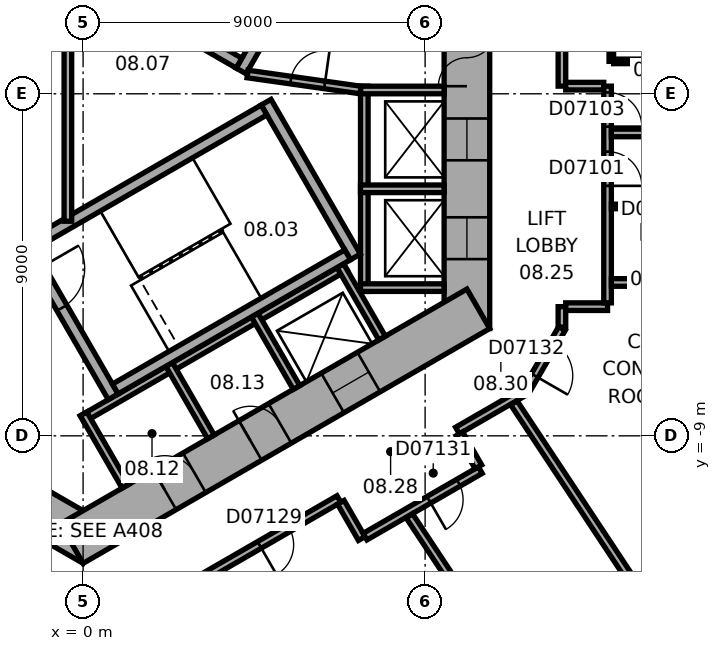
"""IFC4 building model, lengths in metres.
Left out: names, types, materials, properties, quantities, classifications, styles, units other than length and angle.
Written with IfcOpenShell. Run it as: python <this file> out.ifc"""

import sys

from ifc_helpers import new_model, si_unit, direction, frame, frame_2d, origin, place, context, subcontext, project, spatial, rectangle, extrude, element, fill, save


model = new_model("IFC4")
c1 = context("Model", 3, precision=1e-05, world=origin(), true_north=direction((0.0, 1.0)))
c2 = subcontext(c1, "Body", "Model", "MODEL_VIEW")
j1 = project(units=[si_unit("LENGTHUNIT", "METRE"), si_unit("PLANEANGLEUNIT", "RADIAN")], contexts=[c1])
p1 = place(None, origin())
s1 = spatial("IfcSite", under=j1, at=p1, CompositionType="ELEMENT")
p2 = place(p1, origin())
s2 = spatial("IfcBuilding", under=s1, at=p2, CompositionType="ELEMENT")
p3 = place(p2, frame((0.0, 0.0, 47.3)))
s3 = spatial("IfcBuildingStorey", under=s2, at=p3, CompositionType="ELEMENT", Elevation=47.3)
p4 = place(p3, frame((10.1, -6.177, 0.0), z_axis=(0.0, 0.0, 1.0), x_axis=(0.0, 1.0, 0.0)))
e1 = element("IfcWall", 1, at=p4, inside=s3, PredefinedType="SHEAR", context=c2, shape_type="SweptSolid", body=[
    extrude(rectangle(XDim=12.355, YDim=1.2, at=frame_2d((6.177, 0.0))), origin(), (0.0, 0.0, 1.0), 3.3),
])
p5 = place(p4, frame((6.378, 0.0, 0.0)))
e2 = element("IfcOpeningElement", 2, at=p5, cuts=e1, PredefinedType="OPENING", context=c2, shape_type="SweptSolid", body=[
    extrude(rectangle(XDim=1.5, YDim=2.1, at=frame_2d((0.75, 1.05))), frame((0.0, 0.61, 0.0), z_axis=(0.0, -1.0, 0.0), x_axis=(1.0, 0.0, 0.0)), (0.0, 0.0, 1.0), 1.22),
])
p6 = place(p4, frame((1.828, 0.0, 0.0)))
e3 = element("IfcOpeningElement", 3, at=p6, cuts=e1, PredefinedType="OPENING", context=c2, shape_type="SweptSolid", body=[
    extrude(rectangle(XDim=1.1, YDim=2.1, at=frame_2d((0.55, 1.05))), frame((0.0, 0.61, 0.0), z_axis=(0.0, -1.0, 0.0), x_axis=(1.0, 0.0, 0.0)), (0.0, 0.0, 1.0), 1.22),
])
p7 = place(p4, frame((4.427, 0.0, 0.0)))
e4 = element("IfcOpeningElement", 4, at=p7, cuts=e1, PredefinedType="OPENING", context=c2, shape_type="SweptSolid", body=[
    extrude(rectangle(XDim=1.1, YDim=2.1, at=frame_2d((0.55, 1.05))), frame((0.0, 0.61, 0.0), z_axis=(0.0, -1.0, 0.0), x_axis=(1.0, 0.0, 0.0)), (0.0, 0.0, 1.0), 1.22),
])
p8 = place(p3, frame((-10.4, -5.658, 0.0), z_axis=(0.0, 0.0, 1.0), x_axis=(0.866021384402, -0.500006961711, 0.0)))
e5 = element("IfcWall", 5, at=p8, inside=s3, PredefinedType="SHEAR", context=c2, shape_type="SweptSolid", body=[
    extrude(rectangle(XDim=12.355, YDim=1.2, at=frame_2d((6.178, 0.0))), origin(), (0.0, 0.0, 1.0), 3.3),
])
p9 = place(p8, frame((6.378, 0.0, 0.0)))
e6 = element("IfcOpeningElement", 6, at=p9, cuts=e5, PredefinedType="OPENING", context=c2, shape_type="SweptSolid", body=[
    extrude(rectangle(XDim=1.5, YDim=2.1, at=frame_2d((0.75, 1.05))), frame((0.0, 0.61, 0.0), z_axis=(0.0, -1.0, 0.0), x_axis=(1.0, 0.0, 0.0)), (0.0, 0.0, 1.0), 1.22),
])
p10 = place(p8, frame((3.228, 0.0, 0.0)))
e7 = element("IfcOpeningElement", 7, at=p10, cuts=e5, PredefinedType="OPENING", context=c2, shape_type="SweptSolid", body=[
    extrude(rectangle(XDim=0.9, YDim=2.1, at=frame_2d((0.45, 1.05))), frame((0.0, 0.61, 0.0), z_axis=(0.0, -1.0, 0.0), x_axis=(1.0, 0.0, 0.0)), (0.0, 0.0, 1.0), 1.22),
])
p11 = place(p3, frame((-0.3, -11.836, 0.0), z_axis=(0.0, 0.0, 1.0), x_axis=(0.866021384402, 0.500006961711, 0.0)))
e8 = element("IfcWall", 8, at=p11, inside=s3, PredefinedType="SHEAR", context=c2, shape_type="SweptSolid", body=[
    extrude(rectangle(XDim=12.355, YDim=1.2, at=frame_2d((6.178, 0.0))), origin(), (0.0, 0.0, 1.0), 3.3),
])
p12 = place(p11, frame((2.828, 0.0, 0.0)))
e9 = element("IfcOpeningElement", 9, at=p12, cuts=e8, PredefinedType="OPENING", context=c2, shape_type="SweptSolid", body=[
    extrude(rectangle(XDim=0.9, YDim=2.1, at=frame_2d((0.45, 1.05))), frame((0.0, 0.61, 0.0), z_axis=(0.0, -1.0, 0.0), x_axis=(1.0, 0.0, 0.0)), (0.0, 0.0, 1.0), 1.22),
])
p13 = place(p11, frame((5.428, 0.0, 0.0)))
e10 = element("IfcOpeningElement", 10, at=p13, cuts=e8, PredefinedType="OPENING", context=c2, shape_type="SweptSolid", body=[
    extrude(rectangle(XDim=0.9, YDim=2.1, at=frame_2d((0.45, 1.05))), frame((0.0, 0.61, 0.0), z_axis=(0.0, -1.0, 0.0), x_axis=(1.0, 0.0, 0.0)), (0.0, 0.0, 1.0), 1.22),
])
p14 = place(p11, frame((7.928, 0.0, 0.0)))
e11 = element("IfcOpeningElement", 11, at=p14, cuts=e8, PredefinedType="OPENING", context=c2, shape_type="SweptSolid", body=[
    extrude(rectangle(XDim=1.1, YDim=2.1, at=frame_2d((0.55, 1.05))), frame((0.0, 0.61, 0.0), z_axis=(0.0, -1.0, 0.0), x_axis=(1.0, 0.0, 0.0)), (0.0, 0.0, 1.0), 1.22),
])
p15 = place(p3, frame((7.4, -5.2, 0.0), z_axis=(0.0, 0.0, 1.0), x_axis=(0.0, 1.0, 0.0)))
e12 = element("IfcWall", 12, at=p15, inside=s3, PredefinedType="PARTITIONING", context=c2, shape_type="SweptSolid", body=[
    extrude(rectangle(XDim=5.4, YDim=0.2, at=frame_2d((2.7, 0.0))), origin(), (0.0, 0.0, 1.0), 3.05),
])
for number, where, z_axis, x_axis in (
    (13, (7.3, -5.1, 0.0), (0.0, 0.0, 1.0), (1.0, 0.0, 0.0)),
    (14, (7.3, -2.5, 0.0), (0.0, 0.0, 1.0), (1.0, 0.0, 0.0)),
    (15, (7.3, 0.1, 0.0), (0.0, 0.0, 1.0), (1.0, 0.0, 0.0)),
):
    element("IfcWall", number, at=place(p3, frame(where, z_axis=z_axis, x_axis=x_axis)), inside=s3, PredefinedType="PARTITIONING", context=c2, shape_type="SweptSolid", body=[
        extrude(rectangle(XDim=2.2, YDim=0.2, at=frame_2d((1.1, 0.0))), origin(), (0.0, 0.0, 1.0), 3.05),
    ])
p16 = place(p3, frame((-0.024, -8.559, 0.0), z_axis=(0.0, 0.0, 1.0), x_axis=(0.866026010844, 0.49999894854, 0.0)))
e16 = element("IfcWall", 16, at=p16, inside=s3, PredefinedType="PARTITIONING", context=c2, shape_type="SweptSolid", body=[
    extrude(rectangle(XDim=8.0, YDim=0.2, at=frame_2d((4.0, 0.0))), origin(), (0.0, 0.0, 1.0), 3.05),
])
for number, where, z_axis, x_axis in (
    (17, (0.013, -8.422, 0.0), (0.0, 0.0, 1.0), (0.5, -0.866, 0.0)),
    (18, (2.264, -7.122, 0.0), (0.0, 0.0, 1.0), (0.5, -0.866, 0.0)),
    (19, (4.516, -5.822, 0.0), (0.0, 0.0, 1.0), (0.5, -0.866, 0.0)),
    (20, (6.768, -4.522, 0.0), (0.0, 0.0, 1.0), (0.5, -0.866, 0.0)),
):
    element("IfcWall", number, at=place(p3, frame(where, z_axis=z_axis, x_axis=x_axis)), inside=s3, PredefinedType="PARTITIONING", context=c2, shape_type="SweptSolid", body=[
        extrude(rectangle(XDim=2.2, YDim=0.2, at=frame_2d((1.1, 0.0))), origin(), (0.0, 0.0, 1.0), 3.05),
    ])
p17 = place(p3, frame((4.158, 0.602, 0.0), z_axis=(0.0, 0.0, 1.0), x_axis=(0.499977259774, 0.866038532462, 0.0)))
e21 = element("IfcWall", 21, at=p17, inside=s3, PredefinedType="SHEAR", context=c2, shape_type="SweptSolid", body=[
    extrude(rectangle(XDim=4.7, YDim=0.3, at=frame_2d((2.35, 0.0))), origin(), (0.0, 0.0, 1.0), 3.05),
])
p18 = place(p17, frame((0.8, 0.0, 0.0)))
e22 = element("IfcOpeningElement", 22, at=p18, cuts=e21, PredefinedType="OPENING", context=c2, shape_type="SweptSolid", body=[
    extrude(rectangle(XDim=1.2, YDim=2.1, at=frame_2d((0.6, 1.05))), frame((0.0, 0.16, 0.0), z_axis=(0.0, -1.0, 0.0), x_axis=(1.0, 0.0, 0.0)), (0.0, 0.0, 1.0), 0.32),
])
p19 = place(p3, frame((4.103, 0.807, 0.0), z_axis=(0.0, 0.0, 1.0), x_axis=(-0.866027801685, 0.499995846692, 0.0)))
e23 = element("IfcWall", 23, at=p19, inside=s3, PredefinedType="SHEAR", context=c2, shape_type="SweptSolid", body=[
    extrude(rectangle(XDim=7.06, YDim=0.3, at=frame_2d((3.53, 0.0))), origin(), (0.0, 0.0, 1.0), 3.05),
])
p20 = place(p3, frame((-1.558, -3.902, 0.0), z_axis=(0.0, 0.0, 1.0), x_axis=(0.499977259774, -0.866038532462, 0.0)))
e24 = element("IfcWall", 24, at=p20, inside=s3, PredefinedType="SHEAR", context=c2, shape_type="SweptSolid", body=[
    extrude(rectangle(XDim=4.7, YDim=0.3, at=frame_2d((2.35, 0.0))), origin(), (0.0, 0.0, 1.0), 3.05),
])
p21 = place(p20, frame((0.8, 0.0, 0.0)))
e25 = element("IfcOpeningElement", 25, at=p21, cuts=e24, PredefinedType="OPENING", context=c2, shape_type="SweptSolid", body=[
    extrude(rectangle(XDim=1.2, YDim=2.1, at=frame_2d((0.6, 1.05))), frame((0.0, 0.16, 0.0), z_axis=(0.0, -1.0, 0.0), x_axis=(1.0, 0.0, 0.0)), (0.0, 0.0, 1.0), 0.32),
])
p22 = place(p3, frame((4.816, -0.222, 0.0), z_axis=(0.0, 0.0, 1.0), x_axis=(0.499977259774, -0.866038532462, 0.0)))
e26 = element("IfcWall", 26, at=p22, inside=s3, PredefinedType="SHEAR", context=c2, shape_type="SweptSolid", body=[
    extrude(rectangle(XDim=4.7, YDim=0.3, at=frame_2d((2.35, 0.0))), origin(), (0.0, 0.0, 1.0), 3.05),
])
for number, where, z_axis, x_axis in (
    (27, (-1.353, -3.957, 0.0), (0.0, 0.0, 1.0), (0.866, 0.5, 0.0)),
    (28, (0.847, -7.767, 0.0), (0.0, 0.0, 1.0), (0.866, 0.5, 0.0)),
):
    element("IfcWall", number, at=place(p3, frame(where, z_axis=z_axis, x_axis=x_axis)), inside=s3, PredefinedType="SHEAR", context=c2, shape_type="SweptSolid", body=[
        extrude(rectangle(XDim=7.06, YDim=0.3, at=frame_2d((3.53, 0.0))), origin(), (0.0, 0.0, 1.0), 3.05),
    ])
p23 = place(p3, frame((4.327, 0.521, 0.0), z_axis=(0.0, 0.0, 1.0), x_axis=(0.990124376366, -0.14019172346, 0.0)))
e29 = element("IfcWall", 29, at=p23, inside=s3, PredefinedType="PARTITIONING", context=c2, shape_type="SweptSolid", body=[
    extrude(rectangle(XDim=3.002, YDim=0.2, at=frame_2d((1.501, 0.0))), origin(), (0.0, 0.0, 1.0), 3.05),
])
p24 = place(p23, frame((1.15, 0.0, 0.0)))
e30 = element("IfcOpeningElement", 30, at=p24, cuts=e29, PredefinedType="OPENING", context=c2, shape_type="SweptSolid", body=[
    extrude(rectangle(XDim=0.9, YDim=2.1, at=frame_2d((0.45, 1.05))), frame((0.0, 0.11, 0.0), z_axis=(0.0, -1.0, 0.0), x_axis=(1.0, 0.0, 0.0)), (0.0, 0.0, 1.0), 0.22),
])
p25 = place(p3, frame((-0.4, -3.353, 0.0), z_axis=(0.0, 0.0, 1.0), x_axis=(0.0, 1.0, 0.0)))
e31 = element("IfcWall", 31, at=p25, inside=s3, PredefinedType="PARTITIONING", context=c2, shape_type="SweptSolid", body=[
    extrude(rectangle(XDim=6.707, YDim=0.2, at=frame_2d((3.353, 0.0))), origin(), (0.0, 0.0, 1.0), 3.05),
])
p26 = place(p3, frame((1.033, -13.953, 0.0), z_axis=(0.0, 0.0, 1.0), x_axis=(0.866017531406, 0.500013635111, 0.0)))
e32 = element("IfcWall", 32, at=p26, inside=s3, PredefinedType="PARTITIONING", context=c2, shape_type="SweptSolid", body=[
    extrude(rectangle(XDim=6.58, YDim=0.2, at=frame_2d((3.29, 0.0))), origin(), (0.0, 0.0, 1.0), 3.05),
])
p27 = place(p26, frame((4.165, 0.0, 0.0)))
e33 = element("IfcOpeningElement", 33, at=p27, cuts=e32, PredefinedType="OPENING", context=c2, shape_type="SweptSolid", body=[
    extrude(rectangle(XDim=0.9, YDim=2.1, at=frame_2d((0.45, 1.05))), frame((0.0, 0.11, 0.0), z_axis=(0.0, -1.0, 0.0), x_axis=(1.0, 0.0, 0.0)), (0.0, 0.0, 1.0), 0.22),
])
p28 = place(p3, frame((6.782, -10.749, 0.0), z_axis=(0.0, 0.0, 1.0), x_axis=(0.500074377092, -0.865982457891, 0.0)))
e34 = element("IfcWall", 34, at=p28, inside=s3, PredefinedType="PARTITIONING", context=c2, shape_type="SweptSolid", body=[
    extrude(rectangle(XDim=1.101, YDim=0.2, at=frame_2d((0.55, 0.0))), origin(), (0.0, 0.0, 1.0), 3.05),
])
p29 = place(p3, frame((7.419, -11.653, 0.0), z_axis=(0.0, 0.0, 1.0), x_axis=(0.866038154057, 0.49997791523, 0.0)))
e35 = element("IfcWall", 35, at=p29, inside=s3, PredefinedType="PARTITIONING", context=c2, shape_type="SweptSolid", body=[
    extrude(rectangle(XDim=3.502, YDim=0.2, at=frame_2d((1.751, 0.0))), origin(), (0.0, 0.0, 1.0), 3.05),
])
p30 = place(p29, frame((1.94, 0.0, 0.0)))
e36 = element("IfcOpeningElement", 36, at=p30, cuts=e35, PredefinedType="OPENING", context=c2, shape_type="SweptSolid", body=[
    extrude(rectangle(XDim=0.9, YDim=2.1, at=frame_2d((0.45, 1.05))), frame((0.0, 0.11, 0.0), z_axis=(0.0, -1.0, 0.0), x_axis=(1.0, 0.0, 0.0)), (0.0, 0.0, 1.0), 0.22),
])
p31 = place(p3, frame((9.852, -8.861, 0.0), z_axis=(0.0, 0.0, 1.0), x_axis=(0.866013291437, 0.500020978615, 0.0)))
e37 = element("IfcWall", 37, at=p31, inside=s3, PredefinedType="PARTITIONING", context=c2, shape_type="SweptSolid", body=[
    extrude(rectangle(XDim=2.077, YDim=0.2, at=frame_2d((1.038, 0.0))), origin(), (0.0, 0.0, 1.0), 3.05),
])
p32 = place(p3, frame((10.402, -9.815, 0.0), z_axis=(0.0, 0.0, 1.0), x_axis=(-0.499968756647, 0.866043441391, 0.0)))
e38 = element("IfcWall", 38, at=p32, inside=s3, PredefinedType="PARTITIONING", context=c2, shape_type="SweptSolid", body=[
    extrude(rectangle(XDim=1.001, YDim=0.2, at=frame_2d((0.5, 0.0))), origin(), (0.0, 0.0, 1.0), 3.05),
])
p33 = place(p3, frame((11.67, -7.788, 0.0), z_axis=(0.0, 0.0, 1.0), x_axis=(0.500063286585, 0.865988862174, 0.0)))
e39 = element("IfcWall", 39, at=p33, inside=s3, PredefinedType="PARTITIONING", context=c2, shape_type="SweptSolid", body=[
    extrude(rectangle(XDim=1.86, YDim=0.2, at=frame_2d((0.93, 0.0))), origin(), (0.0, 0.0, 1.0), 3.05),
])
p34 = place(p33, frame((0.43, 0.0, 0.0)))
e40 = element("IfcOpeningElement", 40, at=p34, cuts=e39, PredefinedType="OPENING", context=c2, shape_type="SweptSolid", body=[
    extrude(rectangle(XDim=1.0, YDim=2.1, at=frame_2d((0.5, 1.05))), frame((0.0, 0.11, 0.0), z_axis=(0.0, -1.0, 0.0), x_axis=(1.0, 0.0, 0.0)), (0.0, 0.0, 1.0), 0.22),
])
p35 = place(p3, frame((12.6, -6.138, 0.0), z_axis=(0.0, 0.0, 1.0), x_axis=(0.0, 1.0, 0.0)))
e41 = element("IfcWall", 41, at=p35, inside=s3, PredefinedType="PARTITIONING", context=c2, shape_type="SweptSolid", body=[
    extrude(rectangle(XDim=0.537, YDim=0.2, at=frame_2d((0.268, 0.0))), origin(), (0.0, 0.0, 1.0), 3.05),
])
p36 = place(p3, frame((12.6, 0.201, 0.0), z_axis=(0.0, 0.0, 1.0), x_axis=(0.0, 1.0, 0.0)))
e42 = element("IfcWall", 42, at=p36, inside=s3, PredefinedType="PARTITIONING", context=c2, shape_type="SweptSolid", body=[
    extrude(rectangle(XDim=2.604, YDim=0.2, at=frame_2d((1.302, 0.0))), origin(), (0.0, 0.0, 1.0), 3.05),
])
p37 = place(p3, frame((12.7, -5.601, 0.0), z_axis=(0.0, 0.0, 1.0), x_axis=(1.0, 0.0, 0.0)))
e43 = element("IfcWall", 43, at=p37, inside=s3, PredefinedType="PARTITIONING", context=c2, shape_type="SweptSolid", body=[
    extrude(rectangle(XDim=1.101, YDim=0.2, at=frame_2d((0.551, 0.0))), origin(), (0.0, 0.0, 1.0), 3.05),
])
p38 = place(p3, frame((12.974, -17.735, 0.0), z_axis=(0.0, 0.0, 1.0), x_axis=(-0.55192625685, 0.833892922982, 0.0)))
e44 = element("IfcWall", 44, at=p38, inside=s3, PredefinedType="PARTITIONING", context=c2, shape_type="SweptSolid", body=[
    extrude(rectangle(XDim=7.95, YDim=0.2, at=frame_2d((3.975, 0.0))), origin(), (0.0, 0.0, 1.0), 3.05),
])
p39 = place(p3, frame((13.701, 0.201, 0.0), z_axis=(0.0, 0.0, 1.0), x_axis=(-1.0, 0.0, 0.0)))
e45 = element("IfcWall", 45, at=p39, inside=s3, PredefinedType="PARTITIONING", context=c2, shape_type="SweptSolid", body=[
    extrude(rectangle(XDim=1.001, YDim=0.2, at=frame_2d((0.5, 0.0))), origin(), (0.0, 0.0, 1.0), 3.05),
])
p40 = place(p3, frame((13.801, -5.501, 0.0), z_axis=(0.0, 0.0, 1.0), x_axis=(0.0, 1.0, 0.0)))
e46 = element("IfcWall", 46, at=p40, inside=s3, PredefinedType="PARTITIONING", context=c2, shape_type="SweptSolid", body=[
    extrude(rectangle(XDim=5.702, YDim=0.2, at=frame_2d((2.851, 0.0))), origin(), (0.0, 0.0, 1.0), 3.05),
])
p41 = place(p40, frame((3.079, 0.0, 0.0)))
e47 = element("IfcOpeningElement", 47, at=p41, cuts=e46, PredefinedType="OPENING", context=c2, shape_type="SweptSolid", body=[
    extrude(rectangle(XDim=0.9, YDim=2.1, at=frame_2d((0.45, 1.05))), frame((0.0, 0.11, 0.0), z_axis=(0.0, -1.0, 0.0), x_axis=(1.0, 0.0, 0.0)), (0.0, 0.0, 1.0), 0.22),
])
p42 = place(p40, frame((4.636, 0.0, 0.0)))
e48 = element("IfcOpeningElement", 48, at=p42, cuts=e46, PredefinedType="OPENING", context=c2, shape_type="SweptSolid", body=[
    extrude(rectangle(XDim=0.9, YDim=2.1, at=frame_2d((0.45, 1.05))), frame((0.0, 0.11, 0.0), z_axis=(0.0, -1.0, 0.0), x_axis=(1.0, 0.0, 0.0)), (0.0, 0.0, 1.0), 0.22),
])
p43 = place(p3, frame((13.901, -4.965, 0.0), z_axis=(0.0, 0.0, 1.0), x_axis=(1.0, 0.0, 0.0)))
e49 = element("IfcWall", 49, at=p43, inside=s3, PredefinedType="PARTITIONING", context=c2, shape_type="SweptSolid", body=[
    extrude(rectangle(XDim=8.049, YDim=0.2, at=frame_2d((4.024, 0.0))), origin(), (0.0, 0.0, 1.0), 3.05),
])
p44 = place(p3, frame((13.901, -2.965, 0.0), z_axis=(0.0, 0.0, 1.0), x_axis=(1.0, 0.0, 0.0)))
e50 = element("IfcWall", 50, at=p44, inside=s3, PredefinedType="PARTITIONING", context=c2, shape_type="SweptSolid", body=[
    extrude(rectangle(XDim=2.5, YDim=0.12, at=frame_2d((1.25, 0.0))), origin(), (0.0, 0.0, 1.0), 3.05),
])
p45 = place(p44, frame((0.8, 0.0, 0.0)))
e51 = element("IfcOpeningElement", 51, at=p45, cuts=e50, PredefinedType="OPENING", context=c2, shape_type="SweptSolid", body=[
    extrude(rectangle(XDim=0.9, YDim=2.1, at=frame_2d((0.45, 1.05))), frame((0.0, 0.07, 0.0), z_axis=(0.0, -1.0, 0.0), x_axis=(1.0, 0.0, 0.0)), (0.0, 0.0, 1.0), 0.14),
])
p46 = place(p3, frame((13.9, 0.853, 0.0), z_axis=(0.0, 0.0, 1.0), x_axis=(0.0, 1.0, 0.0)))
e52 = element("IfcWall", 52, at=p46, inside=s3, PredefinedType="PARTITIONING", context=c2, shape_type="SweptSolid", body=[
    extrude(rectangle(XDim=1.4, YDim=0.12, at=frame_2d((0.7, 0.0))), origin(), (0.0, 0.0, 1.0), 3.05),
])
p47 = place(p3, frame((16.255, -15.564, 0.0), z_axis=(0.0, 0.0, 1.0), x_axis=(-0.55192208744, 0.833895682562, 0.0)))
e53 = element("IfcWall", 53, at=p47, inside=s3, PredefinedType="PARTITIONING", context=c2, shape_type="SweptSolid", body=[
    extrude(rectangle(XDim=8.913, YDim=0.2, at=frame_2d((4.457, 0.0))), origin(), (0.0, 0.0, 1.0), 2.6),
])
p48 = place(p3, frame((16.5, 0.853, 0.0), z_axis=(0.0, 0.0, 1.0), x_axis=(-1.0, 0.0, 0.0)))
e54 = element("IfcWall", 54, at=p48, inside=s3, PredefinedType="PARTITIONING", context=c2, shape_type="SweptSolid", body=[
    extrude(rectangle(XDim=2.54, YDim=0.12, at=frame_2d((1.27, 0.0))), origin(), (0.0, 0.0, 1.0), 3.05),
])
p49 = place(p48, frame((0.82, 0.0, 0.0)))
e55 = element("IfcOpeningElement", 55, at=p49, cuts=e54, PredefinedType="OPENING", context=c2, shape_type="SweptSolid", body=[
    extrude(rectangle(XDim=0.9, YDim=2.1, at=frame_2d((0.45, 1.05))), frame((0.0, 0.07, 0.0), z_axis=(0.0, -1.0, 0.0), x_axis=(1.0, 0.0, 0.0)), (0.0, 0.0, 1.0), 0.14),
])
p50 = place(p3, frame((21.95, -1.03, 0.0), z_axis=(0.0, 0.0, 1.0), x_axis=(-1.0, 0.0, 0.0)))
e56 = element("IfcWall", 56, at=p50, inside=s3, PredefinedType="PARTITIONING", context=c2, shape_type="SweptSolid", body=[
    extrude(rectangle(XDim=8.049, YDim=0.2, at=frame_2d((4.024, 0.0))), origin(), (0.0, 0.0, 1.0), 2.6),
])
p51 = place(p5, origin())
e57 = element("IfcDoor", 57, at=p51, inside=s3, OperationType="DOUBLE_DOOR_SINGLE_SWING", PredefinedType="DOOR", context=c2, shape_type="SweptSolid", body=[
    extrude(rectangle(XDim=1.5, YDim=2.1, at=frame_2d((0.75, 1.05))), frame((0.0, 0.025, 0.0), z_axis=(0.0, -1.0, 0.0), x_axis=(1.0, 0.0, 0.0)), (0.0, 0.0, 1.0), 0.05),
])
fill(e2, e57)
p52 = place(p21, origin())
e58 = element("IfcDoor", 58, at=p52, inside=s3, OperationType="SINGLE_SWING_RIGHT", PredefinedType="DOOR", context=c2, shape_type="SweptSolid", body=[
    extrude(rectangle(XDim=1.2, YDim=2.1, at=frame_2d((0.6, 1.05))), frame((0.0, 0.025, 0.0), z_axis=(0.0, -1.0, 0.0), x_axis=(1.0, 0.0, 0.0)), (0.0, 0.0, 1.0), 0.05),
])
fill(e25, e58)
p53 = place(p24, origin())
e59 = element("IfcDoor", 59, at=p53, inside=s3, OperationType="SINGLE_SWING_LEFT", PredefinedType="DOOR", context=c2, shape_type="SweptSolid", body=[
    extrude(rectangle(XDim=0.9, YDim=2.1, at=frame_2d((0.45, 1.05))), frame((0.0, 0.025, 0.0), z_axis=(0.0, -1.0, 0.0), x_axis=(1.0, 0.0, 0.0)), (0.0, 0.0, 1.0), 0.05),
])
fill(e30, e59)
p54 = place(p12, origin())
e60 = element("IfcDoor", 60, at=p54, inside=s3, OperationType="SINGLE_SWING_LEFT", PredefinedType="DOOR", context=c2, shape_type="SweptSolid", body=[
    extrude(rectangle(XDim=0.9, YDim=2.1, at=frame_2d((0.45, 1.05))), frame((0.0, 0.025, 0.0), z_axis=(0.0, -1.0, 0.0), x_axis=(1.0, 0.0, 0.0)), (0.0, 0.0, 1.0), 0.05),
])
fill(e9, e60)
p55 = place(p13, origin())
e61 = element("IfcDoor", 61, at=p55, inside=s3, OperationType="SINGLE_SWING_LEFT", PredefinedType="DOOR", context=c2, shape_type="SweptSolid", body=[
    extrude(rectangle(XDim=0.9, YDim=2.1, at=frame_2d((0.45, 1.05))), frame((0.0, 0.025, 0.0), z_axis=(0.0, -1.0, 0.0), x_axis=(1.0, 0.0, 0.0)), (0.0, 0.0, 1.0), 0.05),
])
fill(e10, e61)
p56 = place(p6, origin())
e62 = element("IfcDoor", 62, at=p56, inside=s3, OperationType="DOUBLE_DOOR_SLIDING", PredefinedType="DOOR", context=c2, shape_type="SweptSolid", body=[
    extrude(rectangle(XDim=1.1, YDim=2.1, at=frame_2d((0.55, 1.05))), frame((0.0, 0.025, 0.0), z_axis=(0.0, -1.0, 0.0), x_axis=(1.0, 0.0, 0.0)), (0.0, 0.0, 1.0), 0.05),
])
fill(e3, e62)
p57 = place(p7, origin())
e63 = element("IfcDoor", 63, at=p57, inside=s3, OperationType="DOUBLE_DOOR_SLIDING", PredefinedType="DOOR", context=c2, shape_type="SweptSolid", body=[
    extrude(rectangle(XDim=1.1, YDim=2.1, at=frame_2d((0.55, 1.05))), frame((0.0, 0.025, 0.0), z_axis=(0.0, -1.0, 0.0), x_axis=(1.0, 0.0, 0.0)), (0.0, 0.0, 1.0), 0.05),
])
fill(e4, e63)
p58 = place(p14, origin())
e64 = element("IfcDoor", 64, at=p58, inside=s3, OperationType="DOUBLE_DOOR_SLIDING", PredefinedType="DOOR", context=c2, shape_type="SweptSolid", body=[
    extrude(rectangle(XDim=1.1, YDim=2.1, at=frame_2d((0.55, 1.05))), frame((0.0, 0.025, 0.0), z_axis=(0.0, -1.0, 0.0), x_axis=(1.0, 0.0, 0.0)), (0.0, 0.0, 1.0), 0.05),
])
fill(e11, e64)
p59 = place(p41, origin())
e65 = element("IfcDoor", 65, at=p59, inside=s3, OperationType="SINGLE_SWING_LEFT", PredefinedType="DOOR", context=c2, shape_type="SweptSolid", body=[
    extrude(rectangle(XDim=0.9, YDim=2.1, at=frame_2d((0.45, 1.05))), frame((0.0, 0.025, 0.0), z_axis=(0.0, -1.0, 0.0), x_axis=(1.0, 0.0, 0.0)), (0.0, 0.0, 1.0), 0.05),
])
fill(e47, e65)
p60 = place(p42, origin())
e66 = element("IfcDoor", 66, at=p60, inside=s3, OperationType="SINGLE_SWING_LEFT", PredefinedType="DOOR", context=c2, shape_type="SweptSolid", body=[
    extrude(rectangle(XDim=0.9, YDim=2.1, at=frame_2d((0.45, 1.05))), frame((0.0, 0.025, 0.0), z_axis=(0.0, -1.0, 0.0), x_axis=(1.0, 0.0, 0.0)), (0.0, 0.0, 1.0), 0.05),
])
fill(e48, e66)
p61 = place(p27, origin())
e67 = element("IfcDoor", 67, at=p61, inside=s3, OperationType="SINGLE_SWING_LEFT", PredefinedType="DOOR", context=c2, shape_type="SweptSolid", body=[
    extrude(rectangle(XDim=0.9, YDim=2.1, at=frame_2d((0.45, 1.05))), frame((0.0, 0.025, 0.0), z_axis=(0.0, -1.0, 0.0), x_axis=(1.0, 0.0, 0.0)), (0.0, 0.0, 1.0), 0.05),
])
fill(e33, e67)
p62 = place(p30, origin())
e68 = element("IfcDoor", 68, at=p62, inside=s3, OperationType="SINGLE_SWING_LEFT", PredefinedType="DOOR", context=c2, shape_type="SweptSolid", body=[
    extrude(rectangle(XDim=0.9, YDim=2.1, at=frame_2d((0.45, 1.05))), frame((0.0, 0.025, 0.0), z_axis=(0.0, -1.0, 0.0), x_axis=(1.0, 0.0, 0.0)), (0.0, 0.0, 1.0), 0.05),
])
fill(e36, e68)
p63 = place(p34, origin())
e69 = element("IfcDoor", 69, at=p63, inside=s3, OperationType="SINGLE_SWING_LEFT", PredefinedType="DOOR", context=c2, shape_type="SweptSolid", body=[
    extrude(rectangle(XDim=1.0, YDim=2.1, at=frame_2d((0.5, 1.05))), frame((0.0, 0.025, 0.0), z_axis=(0.0, -1.0, 0.0), x_axis=(1.0, 0.0, 0.0)), (0.0, 0.0, 1.0), 0.05),
])
fill(e40, e69)
save(model, sys.argv[1])
